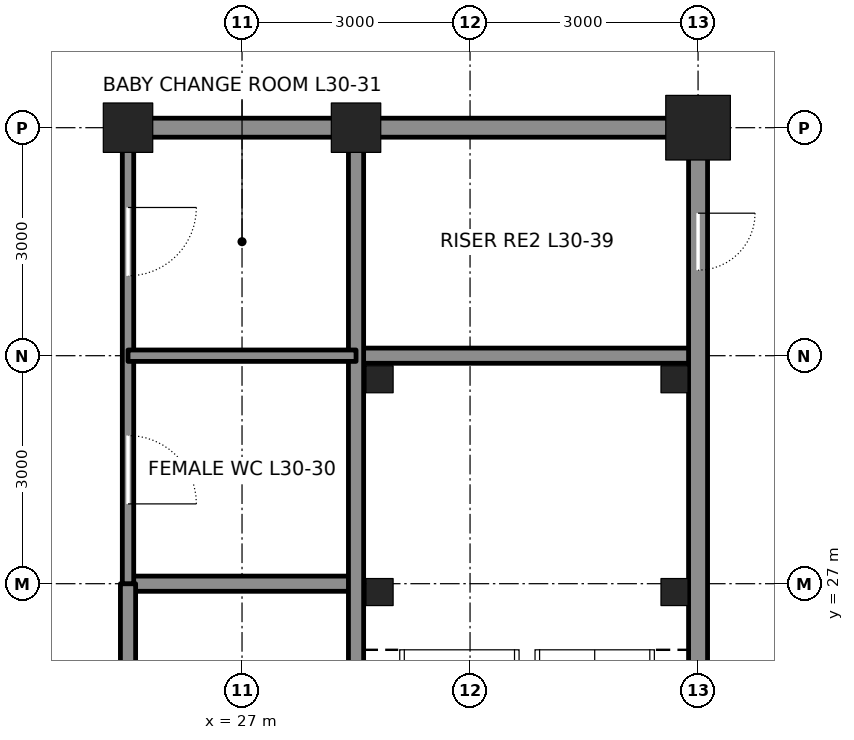
"""IFC4 building model, lengths in metres.
Left out: names, types, materials, properties, quantities, classifications, styles, units other than length and angle.
Written with IfcOpenShell. Run it as: python <this file> out.ifc"""

import sys

from ifc_helpers import new_model, si_unit, direction, frame, frame_2d, origin, origin_2d, place, context, subcontext, project, spatial, rectangle, hollow_rectangle, extrude, element, fill, save


model = new_model("IFC4")
c1 = context("Model", 3, precision=1e-05, world=origin(), true_north=direction((0.0, 1.0)))
c2 = subcontext(c1, "Body", "Model", "MODEL_VIEW")
j1 = project(units=[si_unit("LENGTHUNIT", "METRE"), si_unit("PLANEANGLEUNIT", "RADIAN")], contexts=[c1])
p1 = place(None, origin())
s1 = spatial("IfcSite", under=j1, at=p1, CompositionType="ELEMENT")
p2 = place(p1, origin())
s2 = spatial("IfcBuilding", under=s1, at=p2, CompositionType="ELEMENT")
p3 = place(p2, frame((0.0, 0.0, 140.4)))
s3 = spatial("IfcBuildingStorey", under=s2, at=p3, CompositionType="ELEMENT", Elevation=140.4)
for number, where, z_axis, x_axis in (
    (1, (25.5, 33.0, 0.0), (0.0, 0.0, 1.0), (1.0, 0.0, 0.0)),
    (2, (28.5, 33.0, 0.0), (0.0, 0.0, 1.0), (1.0, 0.0, 0.0)),
):
    element("IfcColumn", number, at=place(p3, frame(where, z_axis=z_axis, x_axis=x_axis)), inside=s3, PredefinedType="COLUMN", context=c2, shape_type="SweptSolid", body=[
        extrude(hollow_rectangle(XDim=0.65, YDim=0.65, WallThickness=0.065, at=origin_2d()), origin(), (0.0, 0.0, 1.0), 4.2),
    ])
p4 = place(p3, frame((33.0, 33.0, 0.0), z_axis=(0.0, 0.0, 1.0), x_axis=(1.0, 0.0, 0.0)))
e3 = element("IfcColumn", 3, at=p4, inside=s3, PredefinedType="COLUMN", context=c2, shape_type="SweptSolid", body=[
    extrude(hollow_rectangle(XDim=0.85, YDim=0.85, WallThickness=0.085, at=origin_2d()), origin(), (0.0, 0.0, 1.0), 4.2),
])
p5 = place(p3, frame((25.5, 27.0, 0.0), z_axis=(0.0, 0.0, 1.0), x_axis=(1.0, 0.0, 0.0)))
e4 = element("IfcWall", 4, at=p5, inside=s3, PredefinedType="SOLIDWALL", context=c2, shape_type="SweptSolid", body=[
    extrude(rectangle(XDim=3.0, YDim=0.2, at=frame_2d((1.5, 0.0))), origin(), (0.0, 0.0, 1.0), 4.04),
])
p6 = place(p3, frame((28.5, 30.0, 0.0), z_axis=(0.0, 0.0, 1.0), x_axis=(1.0, 0.0, 0.0)))
e5 = element("IfcWall", 5, at=p6, inside=s3, PredefinedType="SOLIDWALL", context=c2, shape_type="SweptSolid", body=[
    extrude(rectangle(XDim=4.5, YDim=0.2, at=frame_2d((2.25, 0.0))), origin(), (0.0, 0.0, 1.0), 4.04),
])
p7 = place(p3, frame((25.75, 33.0, 0.0), z_axis=(0.0, 0.0, 1.0), x_axis=(1.0, 0.0, 0.0)))
e6 = element("IfcWall", 6, at=p7, inside=s3, PredefinedType="SOLIDWALL", context=c2, shape_type="SweptSolid", body=[
    extrude(rectangle(XDim=2.5, YDim=0.25, at=frame_2d((1.25, 0.0))), origin(), (0.0, 0.0, 1.0), 3.182),
])
p8 = place(p3, frame((28.75, 33.0, 0.0), z_axis=(0.0, 0.0, 1.0), x_axis=(1.0, 0.0, 0.0)))
e7 = element("IfcWall", 7, at=p8, inside=s3, PredefinedType="SOLIDWALL", context=c2, shape_type="SweptSolid", body=[
    extrude(rectangle(XDim=4.0, YDim=0.25, at=frame_2d((2.0, 0.0))), origin(), (0.0, 0.0, 1.0), 3.182),
])
p9 = place(p3, frame((25.5, 15.0, 0.0), z_axis=(0.0, 0.0, 1.0), x_axis=(0.0, 1.0, 0.0)))
e8 = element("IfcWall", 8, at=p9, inside=s3, PredefinedType="SOLIDWALL", context=c2, shape_type="SweptSolid", body=[
    extrude(rectangle(XDim=12.0, YDim=0.2, at=frame_2d((6.0, 0.0))), origin(), (0.0, 0.0, 1.0), 3.065),
])
p10 = place(p3, frame((25.5, 27.0, 0.0), z_axis=(0.0, 0.0, 1.0), x_axis=(0.0, 1.0, 0.0)))
e9 = element("IfcWall", 9, at=p10, inside=s3, PredefinedType="PARTITIONING", context=c2, shape_type="SweptSolid", body=[
    extrude(rectangle(XDim=5.75, YDim=0.15, at=frame_2d((2.875, 0.0))), origin(), (0.0, 0.0, 1.0), 3.065),
])
p11 = place(p10, frame((1.05, 0.0, 0.0)))
e10 = element("IfcOpeningElement", 10, at=p11, cuts=e9, PredefinedType="OPENING", context=c2, shape_type="SweptSolid", body=[
    extrude(rectangle(XDim=0.9, YDim=2.1, at=frame_2d((0.45, 1.05))), frame((0.0, 0.085, 0.0), z_axis=(0.0, -1.0, 0.0), x_axis=(1.0, 0.0, 0.0)), (0.0, 0.0, 1.0), 0.17),
])
p12 = place(p10, frame((4.05, 0.0, 0.0)))
e11 = element("IfcOpeningElement", 11, at=p12, cuts=e9, PredefinedType="OPENING", context=c2, shape_type="SweptSolid", body=[
    extrude(rectangle(XDim=0.9, YDim=2.1, at=frame_2d((0.45, 1.05))), frame((0.0, 0.085, 0.0), z_axis=(0.0, -1.0, 0.0), x_axis=(1.0, 0.0, 0.0)), (0.0, 0.0, 1.0), 0.17),
])
p13 = place(p3, frame((28.5, 24.25, 0.0), z_axis=(0.0, 0.0, 1.0), x_axis=(0.0, 1.0, 0.0)))
e12 = element("IfcWall", 12, at=p13, inside=s3, PredefinedType="SOLIDWALL", context=c2, shape_type="SweptSolid", body=[
    extrude(rectangle(XDim=8.5, YDim=0.2, at=frame_2d((4.25, 0.0))), origin(), (0.0, 0.0, 1.0), 3.113),
])
p14 = place(p3, frame((33.0, 24.25, 0.0), z_axis=(0.0, 0.0, 1.0), x_axis=(0.0, 1.0, 0.0)))
e13 = element("IfcWall", 13, at=p14, inside=s3, PredefinedType="SOLIDWALL", context=c2, shape_type="SweptSolid", body=[
    extrude(rectangle(XDim=8.5, YDim=0.25, at=frame_2d((4.25, 0.0))), origin(), (0.0, 0.0, 1.0), 3.113),
])
p15 = place(p14, frame((6.875, 0.0, 0.0)))
e14 = element("IfcOpeningElement", 14, at=p15, cuts=e13, PredefinedType="OPENING", context=c2, shape_type="SweptSolid", body=[
    extrude(rectangle(XDim=0.75, YDim=2.1, at=frame_2d((0.375, 1.05))), frame((0.0, 0.135, 0.0), z_axis=(0.0, -1.0, 0.0), x_axis=(1.0, 0.0, 0.0)), (0.0, 0.0, 1.0), 0.27),
])
p16 = place(p3, frame((25.5, 30.0, 0.0), z_axis=(0.0, 0.0, 1.0), x_axis=(1.0, 0.0, 0.0)))
e15 = element("IfcWall", 15, at=p16, inside=s3, PredefinedType="PARTITIONING", context=c2, shape_type="SweptSolid", body=[
    extrude(rectangle(XDim=3.0, YDim=0.15, at=frame_2d((1.5, 0.0))), origin(), (0.0, 0.0, 1.0), 4.04),
])
for number, where, z_axis, x_axis in (
    (16, (28.81, 29.69, 0.0), (0.0, 0.0, 1.0), (1.0, 0.0, 0.0)),
    (17, (32.69, 29.69, 0.0), (0.0, 0.0, 1.0), (1.0, 0.0, 0.0)),
    (18, (28.81, 26.89, 0.0), (0.0, 0.0, 1.0), (1.0, 0.0, 0.0)),
    (19, (32.69, 26.89, 0.0), (0.0, 0.0, 1.0), (1.0, 0.0, 0.0)),
):
    element("IfcColumn", number, at=place(p3, frame(where, z_axis=z_axis, x_axis=x_axis)), inside=s3, PredefinedType="COLUMN", context=c2, shape_type="SweptSolid", body=[
        extrude(hollow_rectangle(XDim=0.356, YDim=0.356, WallThickness=0.015, at=origin_2d()), origin(), (0.0, 0.0, 1.0), 4.2),
    ])
p17 = place(p15, frame((0.75, 0.0, 0.0), z_axis=(0.0, 0.0, 1.0), x_axis=(-1.0, 0.0, 0.0)))
e20 = element("IfcDoor", 20, at=p17, inside=s3, OperationType="SINGLE_SWING_LEFT", PredefinedType="DOOR", context=c2, shape_type="SweptSolid", body=[
    extrude(rectangle(XDim=0.75, YDim=2.1, at=frame_2d((0.375, 1.05))), frame((0.0, 0.025, 0.0), z_axis=(0.0, -1.0, 0.0), x_axis=(1.0, 0.0, 0.0)), (0.0, 0.0, 1.0), 0.05),
])
fill(e14, e20)
p18 = place(p11, frame((0.9, 0.0, 0.0), z_axis=(0.0, 0.0, 1.0), x_axis=(-1.0, 0.0, 0.0)))
e21 = element("IfcDoor", 21, at=p18, inside=s3, OperationType="SINGLE_SWING_RIGHT", PredefinedType="DOOR", context=c2, shape_type="SweptSolid", body=[
    extrude(rectangle(XDim=0.9, YDim=2.1, at=frame_2d((0.45, 1.05))), frame((0.0, 0.025, 0.0), z_axis=(0.0, -1.0, 0.0), x_axis=(1.0, 0.0, 0.0)), (0.0, 0.0, 1.0), 0.05),
])
fill(e10, e21)
p19 = place(p12, frame((0.9, 0.0, 0.0), z_axis=(0.0, 0.0, 1.0), x_axis=(-1.0, 0.0, 0.0)))
e22 = element("IfcDoor", 22, at=p19, inside=s3, OperationType="SINGLE_SWING_LEFT", PredefinedType="DOOR", context=c2, shape_type="SweptSolid", body=[
    extrude(rectangle(XDim=0.9, YDim=2.1, at=frame_2d((0.45, 1.05))), frame((0.0, 0.025, 0.0), z_axis=(0.0, -1.0, 0.0), x_axis=(1.0, 0.0, 0.0)), (0.0, 0.0, 1.0), 0.05),
])
fill(e11, e22)
save(model, sys.argv[1])
